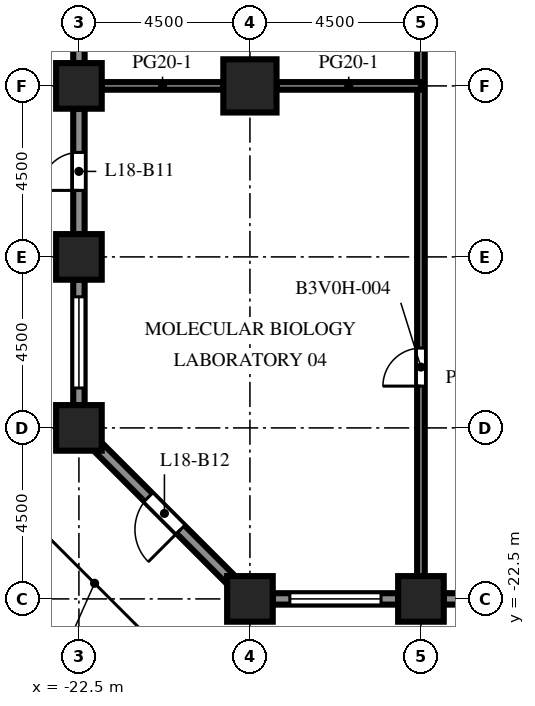
"""IFC4 building model, lengths in metres.
Left out: names, types, materials, properties, quantities, classifications, styles, units other than length and angle.
Written with IfcOpenShell. Run it as: python <this file> out.ifc"""

import sys

from ifc_helpers import new_model, si_unit, direction, frame, frame_2d, origin, origin_2d, place, context, subcontext, project, spatial, rectangle, extrude, element, fill, save


model = new_model("IFC4")
c1 = context("Model", 3, precision=1e-05, world=origin(), true_north=direction((0.0, 1.0)))
c2 = subcontext(c1, "Body", "Model", "MODEL_VIEW")
j1 = project(units=[si_unit("LENGTHUNIT", "METRE"), si_unit("PLANEANGLEUNIT", "RADIAN")], contexts=[c1])
p1 = place(None, origin())
s1 = spatial("IfcSite", under=j1, at=p1, CompositionType="ELEMENT")
p2 = place(p1, origin())
s2 = spatial("IfcBuilding", under=s1, at=p2, CompositionType="ELEMENT")
p3 = place(p2, frame((0.0, 0.0, 82.0)))
s3 = spatial("IfcBuildingStorey", under=s2, at=p3, CompositionType="ELEMENT", Elevation=82.0)
for number, where, z_axis, x_axis in (
    (1, (-22.5, -18.0, 0.0), (0.0, 0.0, 1.0), (1.0, 0.0, 0.0)),
    (2, (-22.5, -13.5, 0.0), (0.0, 0.0, 1.0), (1.0, 0.0, 0.0)),
    (3, (-22.5, -9.0, 0.0), (0.0, 0.0, 1.0), (1.0, 0.0, 0.0)),
    (4, (-18.0, -22.5, 0.0), (0.0, 0.0, 1.0), (1.0, 0.0, 0.0)),
    (5, (-13.5, -22.5, 0.0), (0.0, 0.0, 1.0), (1.0, 0.0, 0.0)),
):
    element("IfcColumn", number, at=place(p3, frame(where, z_axis=z_axis, x_axis=x_axis)), inside=s3, PredefinedType="COLUMN", context=c2, shape_type="SweptSolid", body=[
        extrude(rectangle(XDim=1.2, YDim=1.2, at=origin_2d()), origin(), (0.0, 0.0, 1.0), 4.1),
    ])
p4 = place(p3, frame((-18.0, -9.0, 0.0), z_axis=(0.0, 0.0, 1.0), x_axis=(1.0, 0.0, 0.0)))
e6 = element("IfcColumn", 6, at=p4, inside=s3, PredefinedType="COLUMN", context=c2, shape_type="SweptSolid", body=[
    extrude(rectangle(XDim=1.4, YDim=1.4, at=origin_2d()), origin(), (0.0, 0.0, 1.0), 4.1),
])
p5 = place(p3, frame((-14.1, -22.5, 0.0), z_axis=(0.0, 0.0, 1.0), x_axis=(-1.0, 0.0, 0.0)))
e7 = element("IfcWall", 7, at=p5, inside=s3, PredefinedType="SOLIDWALL", context=c2, shape_type="SweptSolid", body=[
    extrude(rectangle(XDim=3.3, YDim=0.3, at=frame_2d((1.65, 0.0))), origin(), (0.0, 0.0, 1.0), 2.75),
])
p6 = place(p5, frame((0.45, 0.0, 0.8)))
e8 = element("IfcOpeningElement", 8, at=p6, cuts=e7, PredefinedType="OPENING", context=c2, shape_type="SweptSolid", body=[
    extrude(rectangle(XDim=2.4, YDim=1.7, at=frame_2d((1.2, 0.85))), frame((0.0, 0.16, 0.0), z_axis=(0.0, -1.0, 0.0), x_axis=(1.0, 0.0, 0.0)), (0.0, 0.0, 1.0), 0.32),
])
p7 = place(p3, frame((-9.6, -22.5, 0.0), z_axis=(0.0, 0.0, 1.0), x_axis=(-1.0, 0.0, 0.0)))
e9 = element("IfcWall", 9, at=p7, inside=s3, PredefinedType="SOLIDWALL", context=c2, shape_type="SweptSolid", body=[
    extrude(rectangle(XDim=3.3, YDim=0.3, at=frame_2d((1.65, 0.0))), origin(), (0.0, 0.0, 1.0), 2.75),
])
p8 = place(p7, frame((1.15, 0.0, 0.0)))
e10 = element("IfcOpeningElement", 10, at=p8, cuts=e9, PredefinedType="OPENING", context=c2, shape_type="SweptSolid", body=[
    extrude(rectangle(XDim=1.0, YDim=2.2, at=frame_2d((0.5, 1.1))), frame((0.0, 0.16, 0.0), z_axis=(0.0, -1.0, 0.0), x_axis=(1.0, 0.0, 0.0)), (0.0, 0.0, 1.0), 0.32),
])
p9 = place(p3, frame((-22.5, -8.4, 0.0), z_axis=(0.0, 0.0, 1.0), x_axis=(0.0, 1.0, 0.0)))
e11 = element("IfcWall", 11, at=p9, inside=s3, PredefinedType="SOLIDWALL", context=c2, shape_type="SweptSolid", body=[
    extrude(rectangle(XDim=3.3, YDim=0.3, at=frame_2d((1.65, 0.0))), origin(), (0.0, 0.0, 1.0), 2.75),
])
p10 = place(p9, frame((0.45, 0.0, 0.8)))
e12 = element("IfcOpeningElement", 12, at=p10, cuts=e11, PredefinedType="OPENING", context=c2, shape_type="SweptSolid", body=[
    extrude(rectangle(XDim=2.4, YDim=1.7, at=frame_2d((1.2, 0.85))), frame((0.0, 0.16, 0.0), z_axis=(0.0, -1.0, 0.0), x_axis=(1.0, 0.0, 0.0)), (0.0, 0.0, 1.0), 0.32),
])
p11 = place(p3, frame((-22.5, -12.9, 0.0), z_axis=(0.0, 0.0, 1.0), x_axis=(0.0, 1.0, 0.0)))
e13 = element("IfcWall", 13, at=p11, inside=s3, PredefinedType="SOLIDWALL", context=c2, shape_type="SweptSolid", body=[
    extrude(rectangle(XDim=3.3, YDim=0.3, at=frame_2d((1.65, 0.0))), origin(), (0.0, 0.0, 1.0), 2.75),
])
p12 = place(p11, frame((1.15, 0.0, 0.0)))
e14 = element("IfcOpeningElement", 14, at=p12, cuts=e13, PredefinedType="OPENING", context=c2, shape_type="SweptSolid", body=[
    extrude(rectangle(XDim=1.0, YDim=2.2, at=frame_2d((0.5, 1.1))), frame((0.0, 0.16, 0.0), z_axis=(0.0, -1.0, 0.0), x_axis=(1.0, 0.0, 0.0)), (0.0, 0.0, 1.0), 0.32),
])
p13 = place(p3, frame((-22.5, -17.4, 0.0), z_axis=(0.0, 0.0, 1.0), x_axis=(0.0, 1.0, 0.0)))
e15 = element("IfcWall", 15, at=p13, inside=s3, PredefinedType="SOLIDWALL", context=c2, shape_type="SweptSolid", body=[
    extrude(rectangle(XDim=3.3, YDim=0.3, at=frame_2d((1.65, 0.0))), origin(), (0.0, 0.0, 1.0), 2.75),
])
p14 = place(p13, frame((0.45, 0.0, 0.8)))
e16 = element("IfcOpeningElement", 16, at=p14, cuts=e15, PredefinedType="OPENING", context=c2, shape_type="SweptSolid", body=[
    extrude(rectangle(XDim=2.4, YDim=1.7, at=frame_2d((1.2, 0.85))), frame((0.0, 0.16, 0.0), z_axis=(0.0, -1.0, 0.0), x_axis=(1.0, 0.0, 0.0)), (0.0, 0.0, 1.0), 0.32),
])
p15 = place(p3, frame((-18.494, -22.006, 0.0), z_axis=(0.0, 0.0, 1.0), x_axis=(-0.707106781187, 0.707106781187, 0.0)))
e17 = element("IfcWall", 17, at=p15, inside=s3, PredefinedType="SOLIDWALL", context=c2, shape_type="SweptSolid", body=[
    extrude(rectangle(XDim=4.967, YDim=0.3, at=frame_2d((2.483, 0.0))), origin(), (0.0, 0.0, 1.0), 2.75),
])
p16 = place(p15, frame((1.884, 0.0, 0.0)))
e18 = element("IfcOpeningElement", 18, at=p16, cuts=e17, PredefinedType="OPENING", context=c2, shape_type="SweptSolid", body=[
    extrude(rectangle(XDim=1.2, YDim=2.2, at=frame_2d((0.6, 1.1))), frame((0.0, 0.16, 0.0), z_axis=(0.0, -1.0, 0.0), x_axis=(1.0, 0.0, 0.0)), (0.0, 0.0, 1.0), 0.32),
])
p17 = place(p3, frame((-13.5, -21.9, 0.0), z_axis=(0.0, 0.0, 1.0), x_axis=(0.0, 1.0, 0.0)))
e19 = element("IfcWall", 19, at=p17, inside=s3, PredefinedType="PARTITIONING", context=c2, shape_type="SweptSolid", body=[
    extrude(rectangle(XDim=48.3, YDim=0.2, at=frame_2d((24.15, 0.0))), origin(), (0.0, 0.0, 1.0), 3.65),
])
p18 = place(p17, frame((5.0, 0.0, 0.0)))
e20 = element("IfcOpeningElement", 20, at=p18, cuts=e19, PredefinedType="OPENING", context=c2, shape_type="SweptSolid", body=[
    extrude(rectangle(XDim=1.0, YDim=2.1, at=frame_2d((0.5, 1.05))), frame((0.0, 0.11, 0.0), z_axis=(0.0, -1.0, 0.0), x_axis=(1.0, 0.0, 0.0)), (0.0, 0.0, 1.0), 0.22),
])
p19 = place(p17, frame((16.75, 0.0, 0.0)))
e21 = element("IfcOpeningElement", 21, at=p19, cuts=e19, PredefinedType="OPENING", context=c2, shape_type="SweptSolid", body=[
    extrude(rectangle(XDim=1.0, YDim=2.1, at=frame_2d((0.5, 1.05))), frame((0.0, 0.11, 0.0), z_axis=(0.0, -1.0, 0.0), x_axis=(1.0, 0.0, 0.0)), (0.0, 0.0, 1.0), 0.22),
])
p20 = place(p17, frame((28.5, 0.0, 0.0)))
e22 = element("IfcOpeningElement", 22, at=p20, cuts=e19, PredefinedType="OPENING", context=c2, shape_type="SweptSolid", body=[
    extrude(rectangle(XDim=1.0, YDim=2.1, at=frame_2d((0.5, 1.05))), frame((0.0, 0.11, 0.0), z_axis=(0.0, -1.0, 0.0), x_axis=(1.0, 0.0, 0.0)), (0.0, 0.0, 1.0), 0.22),
])
p21 = place(p17, frame((43.0, 0.0, 0.0)))
e23 = element("IfcOpeningElement", 23, at=p21, cuts=e19, PredefinedType="OPENING", context=c2, shape_type="SweptSolid", body=[
    extrude(rectangle(XDim=1.0, YDim=2.1, at=frame_2d((0.5, 1.05))), frame((0.0, 0.11, 0.0), z_axis=(0.0, -1.0, 0.0), x_axis=(1.0, 0.0, 0.0)), (0.0, 0.0, 1.0), 0.22),
])
p22 = place(p3, frame((-21.9, -9.0, 0.0), z_axis=(0.0, 0.0, 1.0), x_axis=(1.0, 0.0, 0.0)))
e24 = element("IfcWall", 24, at=p22, inside=s3, PredefinedType="PARTITIONING", context=c2, shape_type="SweptSolid", body=[
    extrude(rectangle(XDim=3.2, YDim=0.2, at=frame_2d((1.6, 0.0))), origin(), (0.0, 0.0, 1.0), 3.65),
])
p23 = place(p3, frame((-17.3, -9.0, 0.0), z_axis=(0.0, 0.0, 1.0), x_axis=(1.0, 0.0, 0.0)))
e25 = element("IfcWall", 25, at=p23, inside=s3, PredefinedType="PARTITIONING", context=c2, shape_type="SweptSolid", body=[
    extrude(rectangle(XDim=3.8, YDim=0.2, at=frame_2d((1.9, 0.0))), origin(), (0.0, 0.0, 1.0), 3.65),
])
p24 = place(p6, origin())
e26 = element("IfcWindow", 26, at=p24, inside=s3, PartitioningType="SINGLE_PANEL", PredefinedType="WINDOW", context=c2, shape_type="SweptSolid", body=[
    extrude(rectangle(XDim=2.4, YDim=1.7, at=frame_2d((1.2, 0.85))), frame((0.0, 0.03, 0.0), z_axis=(0.0, -1.0, 0.0), x_axis=(1.0, 0.0, 0.0)), (0.0, 0.0, 1.0), 0.06),
])
fill(e8, e26)
p25 = place(p12, origin())
e27 = element("IfcDoor", 27, at=p25, inside=s3, OperationType="SINGLE_SWING_LEFT", PredefinedType="DOOR", context=c2, shape_type="SweptSolid", body=[
    extrude(rectangle(XDim=1.0, YDim=2.2, at=frame_2d((0.5, 1.1))), frame((0.0, 0.025, 0.0), z_axis=(0.0, -1.0, 0.0), x_axis=(1.0, 0.0, 0.0)), (0.0, 0.0, 1.0), 0.05),
])
fill(e14, e27)
p26 = place(p14, origin())
e28 = element("IfcWindow", 28, at=p26, inside=s3, PartitioningType="SINGLE_PANEL", PredefinedType="WINDOW", context=c2, shape_type="SweptSolid", body=[
    extrude(rectangle(XDim=2.4, YDim=1.7, at=frame_2d((1.2, 0.85))), frame((0.0, 0.03, 0.0), z_axis=(0.0, -1.0, 0.0), x_axis=(1.0, 0.0, 0.0)), (0.0, 0.0, 1.0), 0.06),
])
fill(e16, e28)
p27 = place(p16, origin())
e29 = element("IfcDoor", 29, at=p27, inside=s3, OperationType="SINGLE_SWING_LEFT", PredefinedType="DOOR", context=c2, shape_type="SweptSolid", body=[
    extrude(rectangle(XDim=1.2, YDim=2.2, at=frame_2d((0.6, 1.1))), frame((0.0, 0.025, 0.0), z_axis=(0.0, -1.0, 0.0), x_axis=(1.0, 0.0, 0.0)), (0.0, 0.0, 1.0), 0.05),
])
fill(e18, e29)
p28 = place(p18, origin())
e30 = element("IfcDoor", 30, at=p28, inside=s3, OperationType="SINGLE_SWING_LEFT", PredefinedType="DOOR", context=c2, shape_type="SweptSolid", body=[
    extrude(rectangle(XDim=1.0, YDim=2.1, at=frame_2d((0.5, 1.05))), frame((0.0, 0.025, 0.0), z_axis=(0.0, -1.0, 0.0), x_axis=(1.0, 0.0, 0.0)), (0.0, 0.0, 1.0), 0.05),
])
fill(e20, e30)
save(model, sys.argv[1])
